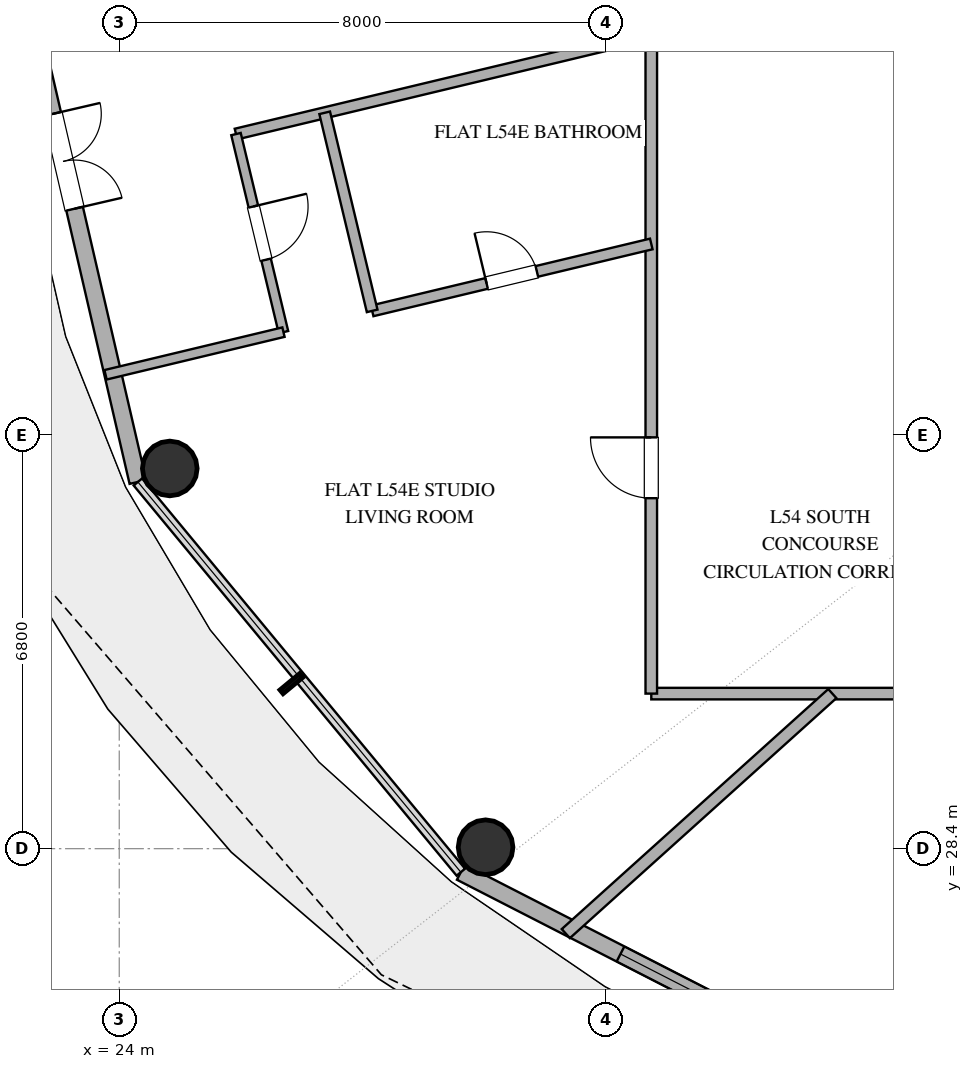
"""IFC4 building model, lengths in metres.
Left out: names, types, materials, properties, quantities, classifications, styles, units other than length and angle.
Written with IfcOpenShell. Run it as: python <this file> out.ifc"""

import sys

from ifc_helpers import new_model, si_unit, direction, frame, frame_2d, origin, origin_2d, place, context, subcontext, project, spatial, rectangle, hollow_circle, extrude, element, fill, save


model = new_model("IFC4")
c1 = context("Model", 3, precision=1e-05, world=origin(), true_north=direction((0.0, 1.0)))
c2 = subcontext(c1, "Body", "Model", "MODEL_VIEW")
j1 = project(units=[si_unit("LENGTHUNIT", "METRE"), si_unit("PLANEANGLEUNIT", "RADIAN")], contexts=[c1])
p1 = place(None, origin())
s1 = spatial("IfcSite", under=j1, at=p1, CompositionType="ELEMENT")
p2 = place(p1, origin())
s2 = spatial("IfcBuilding", under=s1, at=p2, CompositionType="ELEMENT")
p3 = place(p2, frame((0.0, 0.0, 213.6)))
s3 = spatial("IfcBuildingStorey", under=s2, at=p3, CompositionType="ELEMENT", Elevation=213.6)
for number, where, z_axis, x_axis in (
    (1, (24.831, 34.653, 0.0), (0.0, 0.0, 1.0), (1.0, 0.0, 0.0)),
    (2, (30.025, 28.424, 0.0), (0.0, 0.0, 1.0), (1.0, 0.0, 0.0)),
):
    element("IfcColumn", number, at=place(p3, frame(where, z_axis=z_axis, x_axis=x_axis)), inside=s3, PredefinedType="COLUMN", context=c2, shape_type="SweptSolid", body=[
        extrude(hollow_circle(Radius=0.45, WallThickness=0.025, at=origin_2d()), origin(), (0.0, 0.0, 1.0), 3.36),
    ])
p4 = place(p3, frame((22.553, 42.0, 0.0), z_axis=(0.0, 0.0, 1.0), x_axis=(0.225635078214, -0.974211892495, 0.0)))
e3 = element("IfcWall", 3, at=p4, inside=s3, PredefinedType="SOLIDWALL", context=c2, shape_type="SweptSolid", body=[
    extrude(rectangle(XDim=7.77, YDim=0.28, at=frame_2d((3.885, 0.0))), origin(), (0.0, 0.0, 1.0), 3.36),
])
p5 = place(p4, frame((1.557, 0.0, 0.0)))
e4 = element("IfcOpeningElement", 4, at=p5, cuts=e3, PredefinedType="OPENING", context=c2, shape_type="SweptSolid", body=[
    extrude(rectangle(XDim=1.6, YDim=2.25, at=frame_2d((0.8, 1.125))), frame((0.0, 0.15, 0.0), z_axis=(0.0, -1.0, 0.0), x_axis=(1.0, 0.0, 0.0)), (0.0, 0.0, 1.0), 0.3),
])
p6 = place(p3, frame((29.617, 28.013, 0.0), z_axis=(0.0, 0.0, 1.0), x_axis=(0.890007394051, -0.455946091699, 0.0)))
e5 = element("IfcWall", 5, at=p6, inside=s3, PredefinedType="SOLIDWALL", context=c2, shape_type="SweptSolid", body=[
    extrude(rectangle(XDim=9.404, YDim=0.28, at=frame_2d((4.702, 0.0))), origin(), (0.0, 0.0, 1.0), 3.36),
])
p7 = place(p6, frame((2.951, 0.0, 0.85)))
e6 = element("IfcOpeningElement", 6, at=p7, cuts=e5, PredefinedType="OPENING", context=c2, shape_type="SweptSolid", body=[
    extrude(rectangle(XDim=1.8, YDim=2.2, at=frame_2d((0.9, 1.1))), frame((0.0, 0.15, 0.0), z_axis=(0.0, -1.0, 0.0), x_axis=(1.0, 0.0, 0.0)), (0.0, 0.0, 1.0), 0.3),
])
p8 = place(p6, frame((5.454, 0.0, 0.85)))
e7 = element("IfcOpeningElement", 7, at=p8, cuts=e5, PredefinedType="OPENING", context=c2, shape_type="SweptSolid", body=[
    extrude(rectangle(XDim=1.8, YDim=2.2, at=frame_2d((0.9, 1.1))), frame((0.0, 0.15, 0.0), z_axis=(0.0, -1.0, 0.0), x_axis=(1.0, 0.0, 0.0)), (0.0, 0.0, 1.0), 0.3),
])
p9 = place(p3, frame((48.162, 30.95, 0.0), z_axis=(0.0, 0.0, 1.0), x_axis=(-1.0, 0.0, 0.0)))
e8 = element("IfcWall", 8, at=p9, inside=s3, PredefinedType="PARTITIONING", context=c2, shape_type="SweptSolid", body=[
    extrude(rectangle(XDim=15.412, YDim=0.19, at=frame_2d((7.706, 0.0))), origin(), (0.0, 0.0, 1.0), 2.72),
])
p10 = place(p9, frame((6.193, 0.0, 0.0)))
e9 = element("IfcOpeningElement", 9, at=p10, cuts=e8, PredefinedType="OPENING", context=c2, shape_type="SweptSolid", body=[
    extrude(rectangle(XDim=1.0, YDim=2.2, at=frame_2d((0.5, 1.1))), frame((0.0, 0.105, 0.0), z_axis=(0.0, -1.0, 0.0), x_axis=(1.0, 0.0, 0.0)), (0.0, 0.0, 1.0), 0.21),
])
p11 = place(p3, frame((32.75, 30.95, 0.0), z_axis=(0.0, 0.0, 1.0), x_axis=(0.0, 1.0, 0.0)))
e10 = element("IfcWall", 10, at=p11, inside=s3, PredefinedType="PARTITIONING", context=c2, shape_type="SweptSolid", body=[
    extrude(rectangle(XDim=12.148, YDim=0.19, at=frame_2d((6.074, 0.0))), origin(), (0.0, 0.0, 1.0), 2.72),
])
p12 = place(p11, frame((3.214, 0.0, 0.0)))
e11 = element("IfcOpeningElement", 11, at=p12, cuts=e10, PredefinedType="OPENING", context=c2, shape_type="SweptSolid", body=[
    extrude(rectangle(XDim=1.0, YDim=2.2, at=frame_2d((0.5, 1.1))), frame((0.0, 0.105, 0.0), z_axis=(0.0, -1.0, 0.0), x_axis=(1.0, 0.0, 0.0)), (0.0, 0.0, 1.0), 0.21),
])
p13 = place(p3, frame((35.728, 30.95, 0.0), z_axis=(0.0, 0.0, 1.0), x_axis=(-0.743158305959, -0.669115634464, 0.0)))
e12 = element("IfcWall", 12, at=p13, inside=s3, PredefinedType="PARTITIONING", context=c2, shape_type="SweptSolid", body=[
    extrude(rectangle(XDim=5.899, YDim=0.2, at=frame_2d((2.949, 0.0))), origin(), (0.0, 0.0, 1.0), 2.72),
])
p14 = place(p3, frame((32.75, 41.789, 0.0), z_axis=(0.0, 0.0, 1.0), x_axis=(-0.97245226222, -0.233102118618, 0.0)))
e13 = element("IfcWall", 13, at=p14, inside=s3, PredefinedType="PLUMBINGWALL", context=c2, shape_type="SweptSolid", body=[
    extrude(rectangle(XDim=7.024, YDim=0.18, at=frame_2d((3.512, 0.0))), origin(), (0.0, 0.0, 1.0), 2.72),
])
p15 = place(p3, frame((28.159, 37.244, 0.0), z_axis=(0.0, 0.0, 1.0), x_axis=(0.972442669344, 0.233142134415, 0.0)))
e14 = element("IfcWall", 14, at=p15, inside=s3, PredefinedType="PLUMBINGWALL", context=c2, shape_type="SweptSolid", body=[
    extrude(rectangle(XDim=4.721, YDim=0.18, at=frame_2d((2.36, 0.0))), origin(), (0.0, 0.0, 1.0), 2.72),
])
p16 = place(p15, frame((1.935, 0.0, 0.0)))
e15 = element("IfcOpeningElement", 15, at=p16, cuts=e14, PredefinedType="OPENING", context=c2, shape_type="SweptSolid", body=[
    extrude(rectangle(XDim=0.85, YDim=2.1, at=frame_2d((0.425, 1.05))), frame((0.0, 0.1, 0.0), z_axis=(0.0, -1.0, 0.0), x_axis=(1.0, 0.0, 0.0)), (0.0, 0.0, 1.0), 0.2),
])
p17 = place(p3, frame((27.378, 40.501, 0.0), z_axis=(0.0, 0.0, 1.0), x_axis=(0.233144161333, -0.97244218339, 0.0)))
e16 = element("IfcWall", 16, at=p17, inside=s3, PredefinedType="PLUMBINGWALL", context=c2, shape_type="SweptSolid", body=[
    extrude(rectangle(XDim=3.35, YDim=0.18, at=frame_2d((1.675, 0.0))), origin(), (0.0, 0.0, 1.0), 2.72),
])
p18 = place(p3, frame((25.92, 40.152, 0.0), z_axis=(0.0, 0.0, 1.0), x_axis=(0.233075240748, -0.972458704599, 0.0)))
e17 = element("IfcWall", 17, at=p18, inside=s3, PredefinedType="PLUMBINGWALL", context=c2, shape_type="SweptSolid", body=[
    extrude(rectangle(XDim=3.35, YDim=0.16, at=frame_2d((1.675, 0.0))), origin(), (0.0, 0.0, 1.0), 2.72),
])
p19 = place(p18, frame((1.225, 0.0, 0.0)))
e18 = element("IfcOpeningElement", 18, at=p19, cuts=e17, PredefinedType="OPENING", context=c2, shape_type="SweptSolid", body=[
    extrude(rectangle(XDim=0.9, YDim=2.1, at=frame_2d((0.45, 1.05))), frame((0.0, 0.09, 0.0), z_axis=(0.0, -1.0, 0.0), x_axis=(1.0, 0.0, 0.0)), (0.0, 0.0, 1.0), 0.18),
])
p20 = place(p3, frame((26.701, 36.894, 0.0), z_axis=(0.0, 0.0, 1.0), x_axis=(-0.972463854185, -0.233053754107, 0.0)))
e19 = element("IfcWall", 19, at=p20, inside=s3, PredefinedType="PLUMBINGWALL", context=c2, shape_type="SweptSolid", body=[
    extrude(rectangle(XDim=3.009, YDim=0.16, at=frame_2d((1.504, 0.0))), origin(), (0.0, 0.0, 1.0), 2.72),
])
p21 = place(p5, origin())
e20 = element("IfcDoor", 20, at=p21, inside=s3, OperationType="DOUBLE_DOOR_SINGLE_SWING", PredefinedType="DOOR", context=c2, shape_type="SweptSolid", body=[
    extrude(rectangle(XDim=1.6, YDim=2.25, at=frame_2d((0.8, 1.125))), frame((0.0, 0.025, 0.0), z_axis=(0.0, -1.0, 0.0), x_axis=(1.0, 0.0, 0.0)), (0.0, 0.0, 1.0), 0.05),
])
fill(e4, e20)
p22 = place(p7, origin())
e21 = element("IfcWindow", 21, at=p22, inside=s3, PartitioningType="SINGLE_PANEL", PredefinedType="WINDOW", context=c2, shape_type="SweptSolid", body=[
    extrude(rectangle(XDim=1.8, YDim=2.2, at=frame_2d((0.9, 1.1))), frame((0.0, 0.03, 0.0), z_axis=(0.0, -1.0, 0.0), x_axis=(1.0, 0.0, 0.0)), (0.0, 0.0, 1.0), 0.06),
])
fill(e6, e21)
p23 = place(p12, origin())
e22 = element("IfcDoor", 22, at=p23, inside=s3, OperationType="SINGLE_SWING_RIGHT", PredefinedType="DOOR", context=c2, shape_type="SweptSolid", body=[
    extrude(rectangle(XDim=1.0, YDim=2.2, at=frame_2d((0.5, 1.1))), frame((0.0, 0.025, 0.0), z_axis=(0.0, -1.0, 0.0), x_axis=(1.0, 0.0, 0.0)), (0.0, 0.0, 1.0), 0.05),
])
fill(e11, e22)
p24 = place(p16, origin())
e23 = element("IfcDoor", 23, at=p24, inside=s3, OperationType="SINGLE_SWING_LEFT", PredefinedType="DOOR", context=c2, shape_type="SweptSolid", body=[
    extrude(rectangle(XDim=0.85, YDim=2.1, at=frame_2d((0.425, 1.05))), frame((0.0, 0.025, 0.0), z_axis=(0.0, -1.0, 0.0), x_axis=(1.0, 0.0, 0.0)), (0.0, 0.0, 1.0), 0.05),
])
fill(e15, e23)
p25 = place(p19, origin())
e24 = element("IfcDoor", 24, at=p25, inside=s3, OperationType="SINGLE_SWING_LEFT", PredefinedType="DOOR", context=c2, shape_type="SweptSolid", body=[
    extrude(rectangle(XDim=0.9, YDim=2.1, at=frame_2d((0.45, 1.05))), frame((0.0, 0.025, 0.0), z_axis=(0.0, -1.0, 0.0), x_axis=(1.0, 0.0, 0.0)), (0.0, 0.0, 1.0), 0.05),
])
fill(e18, e24)
save(model, sys.argv[1])
